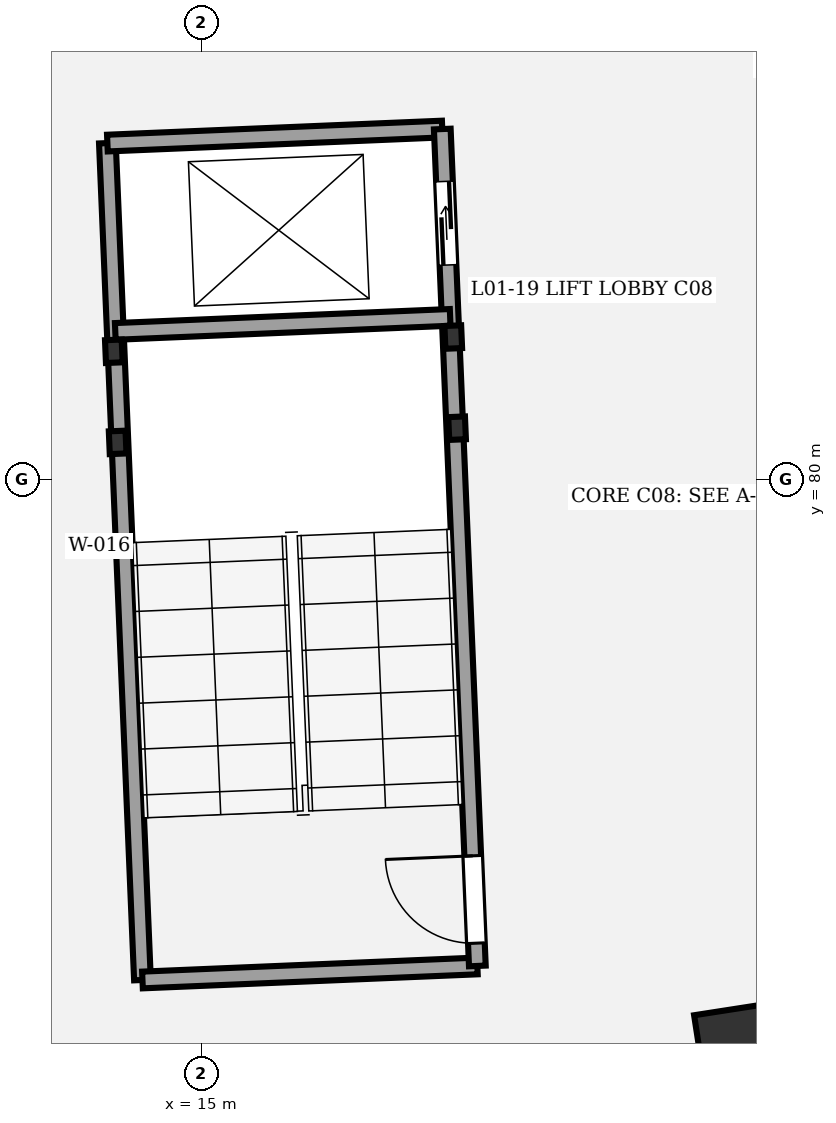
"""IFC4 building model, lengths in metres.
Left out: names, types, materials, properties, quantities, classifications, styles, units other than length and angle.
Written with IfcOpenShell. Run it as: python <this file> out.ifc"""

import sys

from ifc_helpers import new_model, si_unit, direction, frame, frame_2d, origin, origin_2d, place, context, subcontext, project, spatial, rectangle, extrude, element, fill, save


model = new_model("IFC4")
c1 = context("Model", 3, precision=1e-05, world=origin(), true_north=direction((0.0, 1.0)))
c2 = subcontext(c1, "Body", "Model", "MODEL_VIEW")
j1 = project(units=[si_unit("LENGTHUNIT", "METRE"), si_unit("PLANEANGLEUNIT", "RADIAN")], contexts=[c1])
p1 = place(None, origin())
s1 = spatial("IfcSite", under=j1, at=p1, CompositionType="ELEMENT")
p2 = place(p1, origin())
s2 = spatial("IfcBuilding", under=s1, at=p2, CompositionType="ELEMENT")
p3 = place(p2, frame((0.0, 0.0, 5.4)))
s3 = spatial("IfcBuildingStorey", under=s2, at=p3, CompositionType="ELEMENT", Elevation=5.4)
p4 = place(p3, frame((22.0, 72.575, 0.0), z_axis=(0.0, 0.0, 1.0), x_axis=(-0.98817491911, -0.153330783737, 0.0)))
e1 = element("IfcColumn", 1, at=p4, inside=s3, PredefinedType="COLUMN", context=c2, shape_type="SweptSolid", body=[
    extrude(rectangle(XDim=0.9, YDim=0.9, at=origin_2d()), origin(), (0.0, 0.0, 1.0), 4.8),
])
for number, where, z_axis, x_axis in (
    (2, (18.368, 80.675, 0.0), (0.0, 0.0, 1.0), (-0.042, 0.999, 0.0)),
    (3, (18.318, 81.874, 0.0), (0.0, 0.0, 1.0), (-0.042, 0.999, 0.0)),
    (4, (13.852, 81.686, 0.0), (0.0, 0.0, 1.0), (-0.042, 0.999, 0.0)),
    (5, (13.902, 80.487, 0.0), (0.0, 0.0, 1.0), (-0.042, 0.999, 0.0)),
):
    element("IfcColumn", number, at=place(p3, frame(where, z_axis=z_axis, x_axis=x_axis)), inside=s3, PredefinedType="COLUMN", context=c2, shape_type="SweptSolid", body=[
        extrude(rectangle(XDim=0.3, YDim=0.22, at=origin_2d()), origin(), (0.0, 0.0, 1.0), 4.8),
    ])
p5 = place(p3, frame((14.228, 73.415, 0.0), z_axis=(0.0, 0.0, 1.0), x_axis=(-0.041871977473, 0.999122984173, 0.0)))
e6 = element("IfcWall", 6, at=p5, inside=s3, PredefinedType="SHEAR", context=c2, shape_type="SweptSolid", body=[
    extrude(rectangle(XDim=11.02, YDim=0.22, at=frame_2d((5.51, 0.0))), origin(), (0.0, 0.0, 1.0), 4.55),
])
for number, where, z_axis, x_axis in (
    (7, (18.635, 73.6, 0.0), (0.0, 0.0, 1.0), (-0.999, -0.042, 0.0)),
    (8, (18.173, 84.61, 0.0), (0.0, 0.0, 1.0), (-0.999, -0.042, 0.0)),
):
    element("IfcWall", number, at=place(p3, frame(where, z_axis=z_axis, x_axis=x_axis)), inside=s3, PredefinedType="SHEAR", context=c2, shape_type="SweptSolid", body=[
        extrude(rectangle(XDim=4.41, YDim=0.22, at=frame_2d((2.205, 0.0))), origin(), (0.0, 0.0, 1.0), 4.55),
    ])
p6 = place(p3, frame((18.635, 73.6, 0.0), z_axis=(0.0, 0.0, 1.0), x_axis=(-0.041871977473, 0.999122984173, 0.0)))
e9 = element("IfcWall", 9, at=p6, inside=s3, PredefinedType="SHEAR", context=c2, shape_type="SweptSolid", body=[
    extrude(rectangle(XDim=11.02, YDim=0.22, at=frame_2d((5.51, 0.0))), origin(), (0.0, 0.0, 1.0), 4.55),
])
p7 = place(p6, frame((0.3, 0.0, 0.0)))
e10 = element("IfcOpeningElement", 10, at=p7, cuts=e9, PredefinedType="OPENING", context=c2, shape_type="SweptSolid", body=[
    extrude(rectangle(XDim=1.15, YDim=2.15, at=frame_2d((0.575, 1.075))), frame((0.0, 0.12, 0.0), z_axis=(0.0, -1.0, 0.0), x_axis=(1.0, 0.0, 0.0)), (0.0, 0.0, 1.0), 0.24),
])
p8 = place(p6, frame((9.23, 0.0, 0.0)))
e11 = element("IfcOpeningElement", 11, at=p8, cuts=e9, PredefinedType="OPENING", context=c2, shape_type="SweptSolid", body=[
    extrude(rectangle(XDim=1.1, YDim=2.15, at=frame_2d((0.55, 1.075))), frame((0.0, 0.12, 0.0), z_axis=(0.0, -1.0, 0.0), x_axis=(1.0, 0.0, 0.0)), (0.0, 0.0, 1.0), 0.24),
])
p9 = place(p3, frame((18.277, 82.132, 0.0), z_axis=(0.0, 0.0, 1.0), x_axis=(-0.999121521721, -0.041906859039, 0.0)))
e12 = element("IfcWall", 12, at=p9, inside=s3, PredefinedType="SHEAR", context=c2, shape_type="SweptSolid", body=[
    extrude(rectangle(XDim=4.41, YDim=0.22, at=frame_2d((2.205, 0.0))), origin(), (0.0, 0.0, 1.0), 4.55),
])
p10 = place(p7, origin())
e13 = element("IfcDoor", 13, at=p10, inside=s3, OperationType="SINGLE_SWING_RIGHT", PredefinedType="DOOR", context=c2, shape_type="SweptSolid", body=[
    extrude(rectangle(XDim=1.15, YDim=2.15, at=frame_2d((0.575, 1.075))), frame((0.0, 0.025, 0.0), z_axis=(0.0, -1.0, 0.0), x_axis=(1.0, 0.0, 0.0)), (0.0, 0.0, 1.0), 0.05),
])
fill(e10, e13)
p11 = place(p8, origin())
e14 = element("IfcDoor", 14, at=p11, inside=s3, OperationType="DOUBLE_DOOR_SLIDING", PredefinedType="DOOR", context=c2, shape_type="SweptSolid", body=[
    extrude(rectangle(XDim=1.1, YDim=2.15, at=frame_2d((0.55, 1.075))), frame((0.0, 0.025, 0.0), z_axis=(0.0, -1.0, 0.0), x_axis=(1.0, 0.0, 0.0)), (0.0, 0.0, 1.0), 0.05),
])
fill(e11, e14)
save(model, sys.argv[1])
